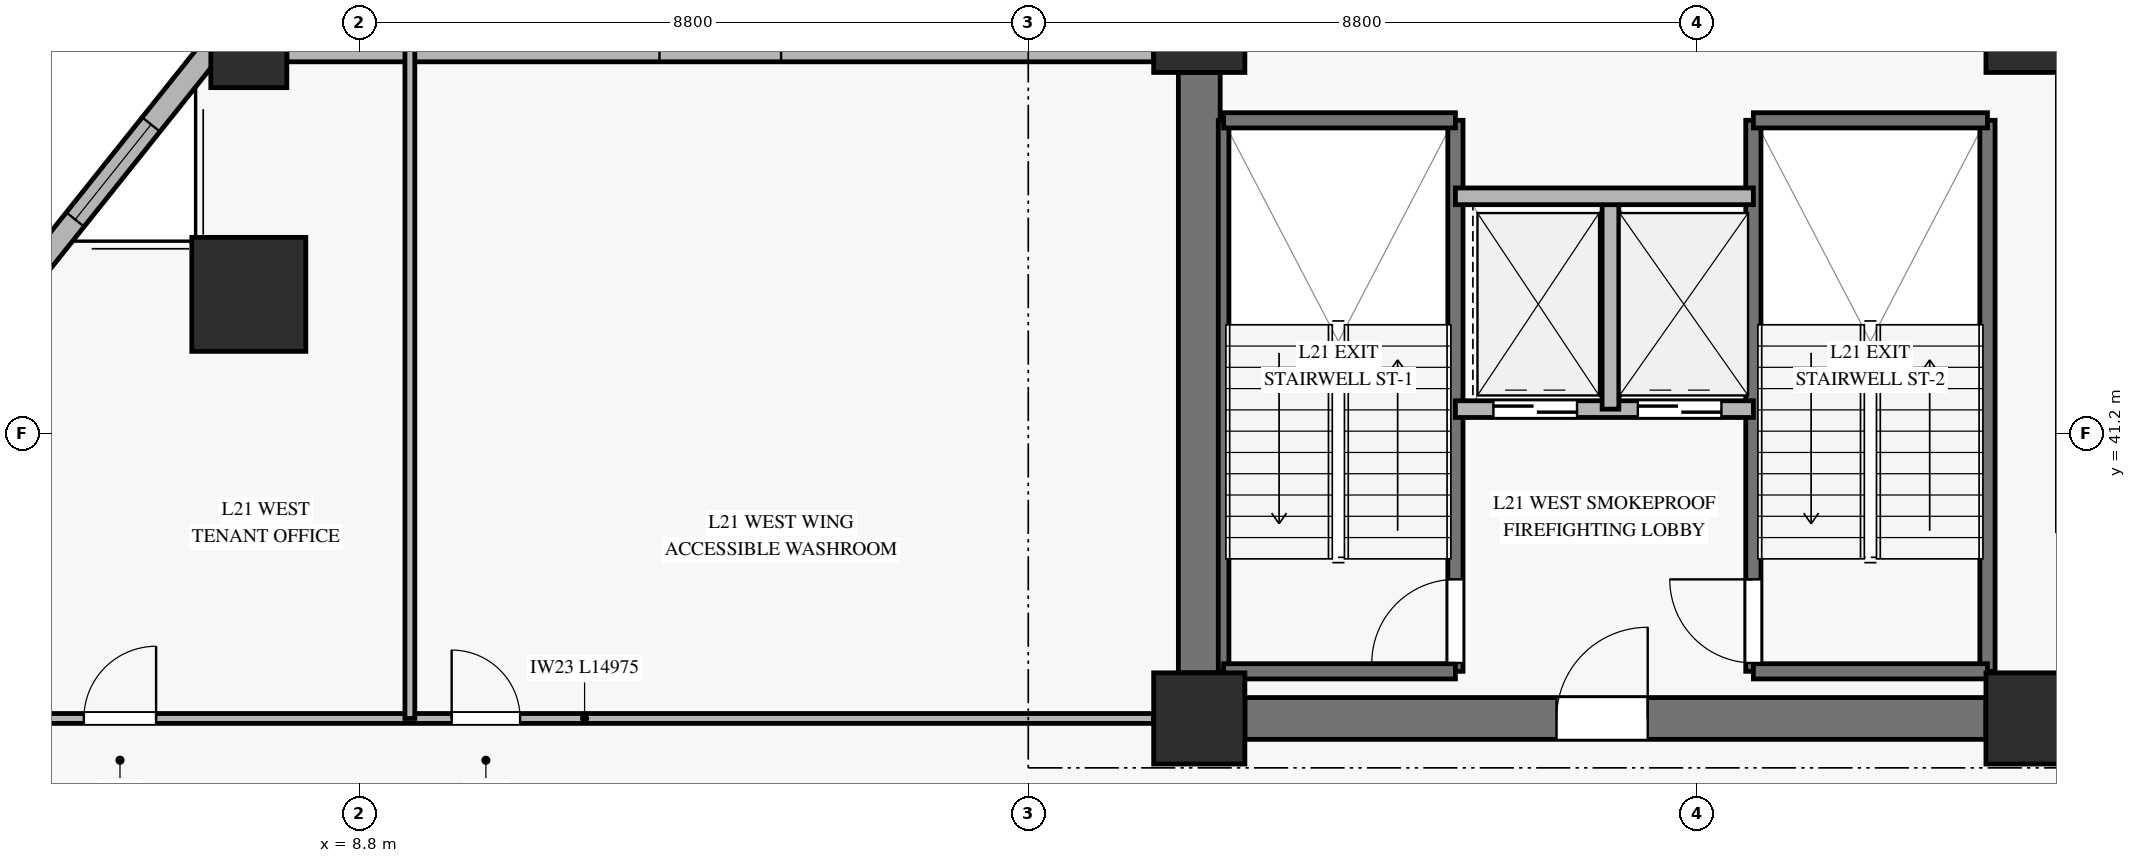
"""IFC4 building model, lengths in metres.
Left out: names, types, materials, properties, quantities, classifications, styles, units other than length and angle.
Written with IfcOpenShell. Run it as: python <this file> out.ifc"""

import sys

from ifc_helpers import new_model, si_unit, direction, frame, frame_2d, origin, origin_2d, place, context, subcontext, project, spatial, rectangle, hollow_rectangle, extrude, source, transform, mapped, element, fill, save


model = new_model("IFC4")
c1 = context("Model", 3, precision=1e-05, world=origin(), true_north=direction((0.0, 1.0)))
c2 = subcontext(c1, "Body", "Model", "MODEL_VIEW")
j1 = project(units=[si_unit("LENGTHUNIT", "METRE"), si_unit("PLANEANGLEUNIT", "RADIAN")], contexts=[c1])
p1 = place(None, origin())
s1 = spatial("IfcSite", under=j1, at=p1, CompositionType="ELEMENT")
p2 = place(p1, origin())
s2 = spatial("IfcBuilding", under=s1, at=p2, CompositionType="ELEMENT")
p3 = place(p2, frame((0.0, 0.0, 87.4)))
s3 = spatial("IfcBuildingStorey", under=s2, at=p3, CompositionType="ELEMENT", Elevation=87.4)
m1 = source(origin(), c2, "Body", "SweptSolid", [
    extrude(rectangle(XDim=1.2, YDim=1.2, at=origin_2d()), origin(), (0.0, 0.0, 1.0), 3.68),
])
for number, where, z_axis, x_axis in (
    (1, (19.85, 37.45, 0.0), (0.0, 0.0, 1.0), (1.0, 0.0, 0.0)),
    (2, (19.85, 46.55, 0.0), (0.0, 0.0, 1.0), (1.0, 0.0, 0.0)),
    (3, (30.8, 37.45, 0.0), (0.0, 0.0, 1.0), (1.0, 0.0, 0.0)),
    (4, (30.8, 46.55, 0.0), (0.0, 0.0, 1.0), (1.0, 0.0, 0.0)),
):
    element("IfcColumn", number, at=place(p3, frame(where, z_axis=z_axis, x_axis=x_axis)), inside=s3, PredefinedType="PILASTER", context=c2, shape_type="MappedRepresentation", body=[
        mapped(m1, transform((0.0, 0.0, 0.0), x_axis=(1.0, 0.0, 0.0), y_axis=(0.0, 1.0, 0.0), z_axis=(0.0, 0.0, 1.0), scale=1.0)),
    ])
p4 = place(p3, frame((20.45, 37.45, 0.0), z_axis=(0.0, 0.0, 1.0), x_axis=(1.0, 0.0, 0.0)))
e5 = element("IfcWall", 5, at=p4, inside=s3, PredefinedType="SHEAR", context=c2, shape_type="SweptSolid", body=[
    extrude(rectangle(XDim=9.75, YDim=0.55, at=frame_2d((4.875, 0.0))), origin(), (0.0, 0.0, 1.0), 3.68),
])
p5 = place(p4, frame((4.1, 0.0, 0.0)))
e6 = element("IfcOpeningElement", 6, at=p5, cuts=e5, PredefinedType="OPENING", context=c2, shape_type="SweptSolid", body=[
    extrude(rectangle(XDim=1.2, YDim=2.15, at=frame_2d((0.6, 1.075))), frame((0.0, 0.285, 0.0), z_axis=(0.0, -1.0, 0.0), x_axis=(1.0, 0.0, 0.0)), (0.0, 0.0, 1.0), 0.57),
])
p6 = place(p3, frame((19.85, 38.05, 0.0), z_axis=(0.0, 0.0, 1.0), x_axis=(0.0, 1.0, 0.0)))
e7 = element("IfcWall", 7, at=p6, inside=s3, PredefinedType="SHEAR", context=c2, shape_type="SweptSolid", body=[
    extrude(rectangle(XDim=7.9, YDim=0.55, at=frame_2d((3.95, 0.0))), origin(), (0.0, 0.0, 1.0), 3.68),
])
m2 = source(origin(), c2, "Body", "SweptSolid", [
    extrude(hollow_rectangle(XDim=1.5, YDim=1.5, WallThickness=0.07, at=origin_2d()), origin(), (0.0, 0.0, 1.0), 3.68),
])
p7 = place(p3, frame((7.345, 43.03, 0.0), z_axis=(0.0, 0.0, 1.0), x_axis=(1.0, 0.0, 0.0)))
e8 = element("IfcColumn", 8, at=p7, inside=s3, PredefinedType="COLUMN", context=c2, shape_type="MappedRepresentation", body=[
    mapped(m2, transform((0.0, 0.0, 0.0), x_axis=(1.0, 0.0, 0.0), y_axis=(0.0, 1.0, 0.0), z_axis=(0.0, 0.0, 1.0), scale=1.0)),
])
m3 = source(origin(), c2, "Body", "SweptSolid", [
    extrude(hollow_rectangle(XDim=1.0, YDim=1.0, WallThickness=0.045, at=origin_2d()), origin(), (0.0, 0.0, 1.0), 3.68),
])
p8 = place(p3, frame((7.345, 46.25, 0.0), z_axis=(0.0, 0.0, 1.0), x_axis=(1.0, 0.0, 0.0)))
e9 = element("IfcColumn", 9, at=p8, inside=s3, PredefinedType="COLUMN", context=c2, shape_type="MappedRepresentation", body=[
    mapped(m3, transform((0.0, 0.0, 0.0), x_axis=(1.0, 0.0, 0.0), y_axis=(0.0, 1.0, 0.0), z_axis=(0.0, 0.0, 1.0), scale=1.0)),
])
p9 = place(p3, frame((7.845, 46.25, 0.0), z_axis=(0.0, 0.0, 1.0), x_axis=(1.0, 0.0, 0.0)))
e10 = element("IfcWall", 10, at=p9, inside=s3, PredefinedType="SOLIDWALL", context=c2, shape_type="SweptSolid", body=[
    extrude(rectangle(XDim=11.405, YDim=0.32, at=frame_2d((5.703, 0.0))), origin(), (0.0, 0.0, 1.0), 3.16),
])
p10 = place(p9, frame((4.903, 0.0, 0.45)))
e11 = element("IfcOpeningElement", 11, at=p10, cuts=e10, PredefinedType="OPENING", context=c2, shape_type="SweptSolid", body=[
    extrude(rectangle(XDim=1.6, YDim=2.0, at=frame_2d((0.8, 1.0))), frame((0.0, 0.17, 0.0), z_axis=(0.0, -1.0, 0.0), x_axis=(1.0, 0.0, 0.0)), (0.0, 0.0, 1.0), 0.34),
])
p11 = place(p3, frame((6.845, 46.25, 0.0), z_axis=(0.0, 0.0, 1.0), x_axis=(-0.623820223262, -0.781567865926, 0.0)))
e12 = element("IfcWall", 12, at=p11, inside=s3, PredefinedType="SOLIDWALL", context=c2, shape_type="SweptSolid", body=[
    extrude(rectangle(XDim=4.12, YDim=0.3, at=frame_2d((2.06, 0.0))), origin(), (0.0, 0.0, 1.0), 3.16),
])
p12 = place(p11, frame((1.26, 0.0, 0.45)))
e13 = element("IfcOpeningElement", 13, at=p12, cuts=e12, PredefinedType="OPENING", context=c2, shape_type="SweptSolid", body=[
    extrude(rectangle(XDim=1.6, YDim=2.0, at=frame_2d((0.8, 1.0))), frame((0.0, 0.16, 0.0), z_axis=(0.0, -1.0, 0.0), x_axis=(1.0, 0.0, 0.0)), (0.0, 0.0, 1.0), 0.32),
])
p13 = place(p3, frame((20.17, 38.07, 0.0), z_axis=(0.0, 0.0, 1.0), x_axis=(0.0, 1.0, 0.0)))
e14 = element("IfcWall", 14, at=p13, inside=s3, PredefinedType="SOLIDWALL", context=c2, shape_type="SweptSolid", body=[
    extrude(rectangle(XDim=7.25, YDim=0.14, at=frame_2d((3.625, 0.0))), origin(), (0.0, 0.0, 1.0), 3.9),
])
p14 = place(p3, frame((23.22, 38.07, 0.0), z_axis=(0.0, 0.0, 1.0), x_axis=(0.0, 1.0, 0.0)))
e15 = element("IfcWall", 15, at=p14, inside=s3, PredefinedType="SOLIDWALL", context=c2, shape_type="SweptSolid", body=[
    extrude(rectangle(XDim=7.25, YDim=0.2, at=frame_2d((3.625, 0.0))), origin(), (0.0, 0.0, 1.0), 3.9),
])
p15 = place(p14, frame((0.11, 0.0, 0.0)))
e16 = element("IfcOpeningElement", 16, at=p15, cuts=e15, PredefinedType="OPENING", context=c2, shape_type="SweptSolid", body=[
    extrude(rectangle(XDim=1.1, YDim=2.15, at=frame_2d((0.55, 1.075))), frame((0.0, 0.11, 0.0), z_axis=(0.0, -1.0, 0.0), x_axis=(1.0, 0.0, 0.0)), (0.0, 0.0, 1.0), 0.22),
])
for number, where, z_axis, x_axis in (
    (17, (20.17, 45.32, 0.0), (0.0, 0.0, 1.0), (1.0, 0.0, 0.0)),
    (18, (20.17, 38.07, 0.0), (0.0, 0.0, 1.0), (1.0, 0.0, 0.0)),
):
    element("IfcWall", number, at=place(p3, frame(where, z_axis=z_axis, x_axis=x_axis)), inside=s3, PredefinedType="SOLIDWALL", context=c2, shape_type="SweptSolid", body=[
        extrude(rectangle(XDim=3.05, YDim=0.2, at=frame_2d((1.525, 0.0))), origin(), (0.0, 0.0, 1.0), 3.9),
    ])
p16 = place(p3, frame((27.14, 38.07, 0.0), z_axis=(0.0, 0.0, 1.0), x_axis=(0.0, 1.0, 0.0)))
e19 = element("IfcWall", 19, at=p16, inside=s3, PredefinedType="SOLIDWALL", context=c2, shape_type="SweptSolid", body=[
    extrude(rectangle(XDim=7.25, YDim=0.2, at=frame_2d((3.625, 0.0))), origin(), (0.0, 0.0, 1.0), 3.9),
])
p17 = place(p16, frame((0.11, 0.0, 0.0)))
e20 = element("IfcOpeningElement", 20, at=p17, cuts=e19, PredefinedType="OPENING", context=c2, shape_type="SweptSolid", body=[
    extrude(rectangle(XDim=1.1, YDim=2.15, at=frame_2d((0.55, 1.075))), frame((0.0, 0.11, 0.0), z_axis=(0.0, -1.0, 0.0), x_axis=(1.0, 0.0, 0.0)), (0.0, 0.0, 1.0), 0.22),
])
p18 = place(p3, frame((30.22, 38.07, 0.0), z_axis=(0.0, 0.0, 1.0), x_axis=(0.0, 1.0, 0.0)))
e21 = element("IfcWall", 21, at=p18, inside=s3, PredefinedType="SOLIDWALL", context=c2, shape_type="SweptSolid", body=[
    extrude(rectangle(XDim=7.25, YDim=0.2, at=frame_2d((3.625, 0.0))), origin(), (0.0, 0.0, 1.0), 3.9),
])
for number, where, z_axis, x_axis in (
    (22, (27.14, 45.32, 0.0), (0.0, 0.0, 1.0), (1.0, 0.0, 0.0)),
    (23, (27.14, 38.07, 0.0), (0.0, 0.0, 1.0), (1.0, 0.0, 0.0)),
):
    element("IfcWall", number, at=place(p3, frame(where, z_axis=z_axis, x_axis=x_axis)), inside=s3, PredefinedType="SOLIDWALL", context=c2, shape_type="SweptSolid", body=[
        extrude(rectangle(XDim=3.08, YDim=0.2, at=frame_2d((1.54, 0.0))), origin(), (0.0, 0.0, 1.0), 3.9),
    ])
p19 = place(p3, frame((23.22, 41.52, 0.0), z_axis=(0.0, 0.0, 1.0), x_axis=(1.0, 0.0, 0.0)))
e24 = element("IfcWall", 24, at=p19, inside=s3, PredefinedType="SOLIDWALL", context=c2, shape_type="SweptSolid", body=[
    extrude(rectangle(XDim=3.92, YDim=0.22, at=frame_2d((1.96, 0.0))), origin(), (0.0, 0.0, 1.0), 3.68),
])
p20 = place(p19, frame((0.5, 0.0, 0.0)))
e25 = element("IfcOpeningElement", 25, at=p20, cuts=e24, PredefinedType="OPENING", context=c2, shape_type="SweptSolid", body=[
    extrude(rectangle(XDim=1.1, YDim=2.2, at=frame_2d((0.55, 1.1))), frame((0.0, 0.12, 0.0), z_axis=(0.0, -1.0, 0.0), x_axis=(1.0, 0.0, 0.0)), (0.0, 0.0, 1.0), 0.24),
])
p21 = place(p19, frame((2.4, 0.0, 0.0)))
e26 = element("IfcOpeningElement", 26, at=p21, cuts=e24, PredefinedType="OPENING", context=c2, shape_type="SweptSolid", body=[
    extrude(rectangle(XDim=1.1, YDim=2.2, at=frame_2d((0.55, 1.1))), frame((0.0, 0.12, 0.0), z_axis=(0.0, -1.0, 0.0), x_axis=(1.0, 0.0, 0.0)), (0.0, 0.0, 1.0), 0.24),
])
p22 = place(p3, frame((25.26, 41.52, 0.0), z_axis=(0.0, 0.0, 1.0), x_axis=(0.0, 1.0, 0.0)))
e27 = element("IfcWall", 27, at=p22, inside=s3, PredefinedType="SOLIDWALL", context=c2, shape_type="SweptSolid", body=[
    extrude(rectangle(XDim=2.8, YDim=0.22, at=frame_2d((1.4, 0.0))), origin(), (0.0, 0.0, 1.0), 3.68),
])
p23 = place(p3, frame((23.22, 44.32, 0.0), z_axis=(0.0, 0.0, 1.0), x_axis=(1.0, 0.0, 0.0)))
e28 = element("IfcWall", 28, at=p23, inside=s3, PredefinedType="SOLIDWALL", context=c2, shape_type="SweptSolid", body=[
    extrude(rectangle(XDim=3.92, YDim=0.22, at=frame_2d((1.96, 0.0))), origin(), (0.0, 0.0, 1.0), 3.68),
])
p24 = place(p3, frame((4.275, 37.45, 0.0), z_axis=(0.0, 0.0, 1.0), x_axis=(1.0, 0.0, 0.0)))
e29 = element("IfcWall", 29, at=p24, inside=s3, PredefinedType="PARTITIONING", context=c2, shape_type="SweptSolid", body=[
    extrude(rectangle(XDim=14.975, YDim=0.13, at=frame_2d((7.488, 0.0))), origin(), (0.0, 0.0, 1.0), 3.165),
])
p25 = place(p24, frame((0.9, 0.0, 0.0)))
e30 = element("IfcOpeningElement", 30, at=p25, cuts=e29, PredefinedType="OPENING", context=c2, shape_type="SweptSolid", body=[
    extrude(rectangle(XDim=0.95, YDim=2.1, at=frame_2d((0.475, 1.05))), frame((0.0, 0.075, 0.0), z_axis=(0.0, -1.0, 0.0), x_axis=(1.0, 0.0, 0.0)), (0.0, 0.0, 1.0), 0.15),
])
p26 = place(p24, frame((5.739, 0.0, 0.0)))
e31 = element("IfcOpeningElement", 31, at=p26, cuts=e29, PredefinedType="OPENING", context=c2, shape_type="SweptSolid", body=[
    extrude(rectangle(XDim=0.9, YDim=2.1, at=frame_2d((0.45, 1.05))), frame((0.0, 0.075, 0.0), z_axis=(0.0, -1.0, 0.0), x_axis=(1.0, 0.0, 0.0)), (0.0, 0.0, 1.0), 0.15),
])
p27 = place(p3, frame((9.464, 37.45, 0.0), z_axis=(0.0, 0.0, 1.0), x_axis=(0.0, 1.0, 0.0)))
e32 = element("IfcWall", 32, at=p27, inside=s3, PredefinedType="PARTITIONING", context=c2, shape_type="SweptSolid", body=[
    extrude(rectangle(XDim=8.8, YDim=0.13, at=frame_2d((4.4, 0.0))), origin(), (0.0, 0.0, 1.0), 3.68),
])
m4 = source(origin(), c2, "Body", "SweptSolid", [
    extrude(rectangle(XDim=1.6, YDim=2.0, at=frame_2d((0.8, 1.0))), frame((0.0, 0.03, 0.0), z_axis=(0.0, -1.0, 0.0), x_axis=(1.0, 0.0, 0.0)), (0.0, 0.0, 1.0), 0.06),
])
p28 = place(p12, origin())
e33 = element("IfcWindow", 33, at=p28, inside=s3, PartitioningType="SINGLE_PANEL", PredefinedType="WINDOW", context=c2, shape_type="MappedRepresentation", body=[
    mapped(m4, transform((0.0, 0.0, 0.0), x_axis=(1.0, 0.0, 0.0), y_axis=(0.0, 1.0, 0.0), z_axis=(0.0, 0.0, 1.0), scale=1.0)),
])
fill(e13, e33)
m5 = source(origin(), c2, "Body", "SweptSolid", [
    extrude(rectangle(XDim=1.1, YDim=2.15, at=frame_2d((0.55, 1.075))), frame((0.0, 0.025, 0.0), z_axis=(0.0, -1.0, 0.0), x_axis=(1.0, 0.0, 0.0)), (0.0, 0.0, 1.0), 0.05),
])
p29 = place(p15, origin())
e34 = element("IfcDoor", 34, at=p29, inside=s3, OperationType="SINGLE_SWING_LEFT", PredefinedType="DOOR", context=c2, shape_type="MappedRepresentation", body=[
    mapped(m5, transform((0.0, 0.0, 0.0), x_axis=(1.0, 0.0, 0.0), y_axis=(0.0, 1.0, 0.0), z_axis=(0.0, 0.0, 1.0), scale=1.0)),
])
fill(e16, e34)
p30 = place(p17, origin())
e35 = element("IfcDoor", 35, at=p30, inside=s3, OperationType="SINGLE_SWING_RIGHT", PredefinedType="DOOR", context=c2, shape_type="MappedRepresentation", body=[
    mapped(m5, transform((0.0, 0.0, 0.0), x_axis=(1.0, 0.0, 0.0), y_axis=(0.0, 1.0, 0.0), z_axis=(0.0, 0.0, 1.0), scale=1.0)),
])
fill(e20, e35)
m6 = source(origin(), c2, "Body", "SweptSolid", [
    extrude(rectangle(XDim=1.1, YDim=2.2, at=frame_2d((0.55, 1.1))), frame((0.0, 0.025, 0.0), z_axis=(0.0, -1.0, 0.0), x_axis=(1.0, 0.0, 0.0)), (0.0, 0.0, 1.0), 0.05),
])
p31 = place(p20, origin())
e36 = element("IfcDoor", 36, at=p31, inside=s3, OperationType="SLIDING_TO_LEFT", PredefinedType="DOOR", context=c2, shape_type="MappedRepresentation", body=[
    mapped(m6, transform((0.0, 0.0, 0.0), x_axis=(1.0, 0.0, 0.0), y_axis=(0.0, 1.0, 0.0), z_axis=(0.0, 0.0, 1.0), scale=1.0)),
])
fill(e25, e36)
p32 = place(p21, origin())
e37 = element("IfcDoor", 37, at=p32, inside=s3, OperationType="SLIDING_TO_LEFT", PredefinedType="DOOR", context=c2, shape_type="MappedRepresentation", body=[
    mapped(m6, transform((0.0, 0.0, 0.0), x_axis=(1.0, 0.0, 0.0), y_axis=(0.0, 1.0, 0.0), z_axis=(0.0, 0.0, 1.0), scale=1.0)),
])
fill(e26, e37)
m7 = source(origin(), c2, "Body", "SweptSolid", [
    extrude(rectangle(XDim=1.2, YDim=2.15, at=frame_2d((0.6, 1.075))), frame((0.0, 0.025, 0.0), z_axis=(0.0, -1.0, 0.0), x_axis=(1.0, 0.0, 0.0)), (0.0, 0.0, 1.0), 0.05),
])
p33 = place(p5, origin())
e38 = element("IfcDoor", 38, at=p33, inside=s3, OperationType="SINGLE_SWING_RIGHT", PredefinedType="DOOR", context=c2, shape_type="MappedRepresentation", body=[
    mapped(m7, transform((0.0, 0.0, 0.0), x_axis=(1.0, 0.0, 0.0), y_axis=(0.0, 1.0, 0.0), z_axis=(0.0, 0.0, 1.0), scale=1.0)),
])
fill(e6, e38)
m8 = source(origin(), c2, "Body", "SweptSolid", [
    extrude(rectangle(XDim=0.95, YDim=2.1, at=frame_2d((0.475, 1.05))), frame((0.0, 0.025, 0.0), z_axis=(0.0, -1.0, 0.0), x_axis=(1.0, 0.0, 0.0)), (0.0, 0.0, 1.0), 0.05),
])
p34 = place(p25, origin())
e39 = element("IfcDoor", 39, at=p34, inside=s3, OperationType="SINGLE_SWING_RIGHT", PredefinedType="DOOR", context=c2, shape_type="MappedRepresentation", body=[
    mapped(m8, transform((0.0, 0.0, 0.0), x_axis=(1.0, 0.0, 0.0), y_axis=(0.0, 1.0, 0.0), z_axis=(0.0, 0.0, 1.0), scale=1.0)),
])
fill(e30, e39)
m9 = source(origin(), c2, "Body", "SweptSolid", [
    extrude(rectangle(XDim=0.9, YDim=2.1, at=frame_2d((0.45, 1.05))), frame((0.0, 0.025, 0.0), z_axis=(0.0, -1.0, 0.0), x_axis=(1.0, 0.0, 0.0)), (0.0, 0.0, 1.0), 0.05),
])
p35 = place(p26, origin())
e40 = element("IfcDoor", 40, at=p35, inside=s3, OperationType="SINGLE_SWING_LEFT", PredefinedType="DOOR", context=c2, shape_type="MappedRepresentation", body=[
    mapped(m9, transform((0.0, 0.0, 0.0), x_axis=(1.0, 0.0, 0.0), y_axis=(0.0, 1.0, 0.0), z_axis=(0.0, 0.0, 1.0), scale=1.0)),
])
fill(e31, e40)
save(model, sys.argv[1])
